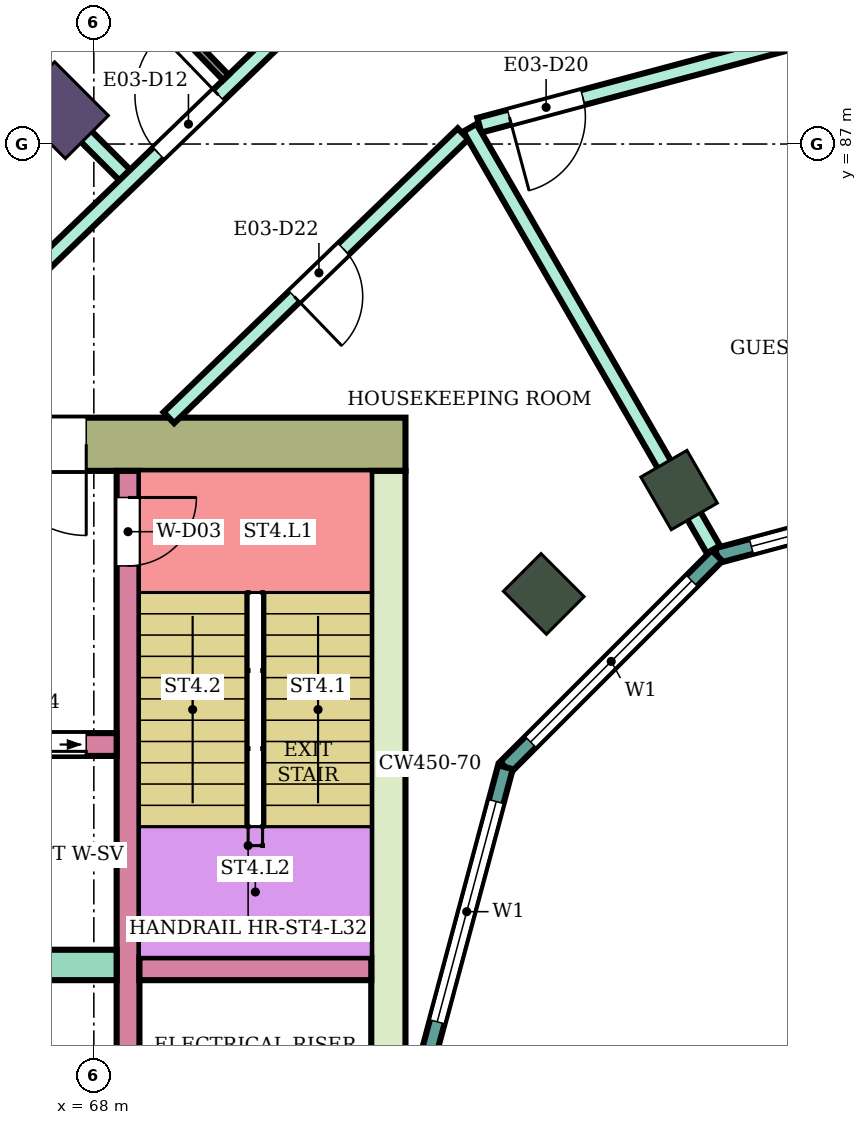
"""IFC4 building model, lengths in metres.
Left out: names, types, materials, properties, quantities, classifications, styles, units other than length and angle.
Written with IfcOpenShell. Run it as: python <this file> out.ifc"""

import sys

from ifc_helpers import new_model, si_unit, direction, frame, frame_2d, origin, origin_2d, place, context, subcontext, project, spatial, rectangle, extrude, element, fill, save


model = new_model("IFC4")
c1 = context("Model", 3, precision=1e-05, world=origin(), true_north=direction((0.0, 1.0)))
c2 = subcontext(c1, "Body", "Model", "MODEL_VIEW")
j1 = project(units=[si_unit("LENGTHUNIT", "METRE"), si_unit("PLANEANGLEUNIT", "RADIAN")], contexts=[c1])
p1 = place(None, origin())
s1 = spatial("IfcSite", under=j1, at=p1, CompositionType="ELEMENT")
p2 = place(p1, origin())
s2 = spatial("IfcBuilding", under=s1, at=p2, CompositionType="ELEMENT")
p3 = place(p2, frame((0.0, 0.0, 138.0)))
s3 = spatial("IfcBuildingStorey", under=s2, at=p3, CompositionType="ELEMENT", Elevation=138.0)
p4 = place(p3, frame((67.555, 87.445, 0.0), z_axis=(0.0, 0.0, 1.0), x_axis=(-0.707106781187, 0.707106781187, 0.0)))
e1 = element("IfcColumn", 1, at=p4, inside=s3, PredefinedType="COLUMN", context=c2, shape_type="SweptSolid", body=[
    extrude(rectangle(XDim=1.0, YDim=0.8, at=origin_2d()), origin(), (0.0, 0.0, 1.0), 3.9),
])
for number, where, z_axis, x_axis in (
    (2, (75.7, 82.448, 0.0), (0.0, 0.0, 1.0), (-0.5, 0.866, 0.0)),
    (3, (73.919, 81.081, 0.0), (0.0, 0.0, 1.0), (-0.707, 0.707, 0.0)),
):
    element("IfcColumn", number, at=place(p3, frame(where, z_axis=z_axis, x_axis=x_axis)), inside=s3, PredefinedType="COLUMN", context=c2, shape_type="SweptSolid", body=[
        extrude(rectangle(XDim=0.8, YDim=0.7, at=origin_2d()), origin(), (0.0, 0.0, 1.0), 3.9),
    ])
p5 = place(p3, frame((72.1, 83.05, 0.0), z_axis=(0.0, 0.0, 1.0), x_axis=(-1.0, 0.0, 0.0)))
e4 = element("IfcWall", 4, at=p5, inside=s3, PredefinedType="SHEAR", context=c2, shape_type="SweptSolid", body=[
    extrude(rectangle(XDim=14.8, YDim=0.7, at=frame_2d((7.4, 0.0))), origin(), (0.0, 0.0, 1.0), 3.58),
])
p6 = place(p5, frame((4.2, 0.0, 0.0)))
e5 = element("IfcOpeningElement", 5, at=p6, cuts=e4, PredefinedType="OPENING", context=c2, shape_type="SweptSolid", body=[
    extrude(rectangle(XDim=2.4, YDim=2.4, at=frame_2d((1.2, 1.2))), frame((0.0, 0.36, 0.0), z_axis=(0.0, -1.0, 0.0), x_axis=(1.0, 0.0, 0.0)), (0.0, 0.0, 1.0), 0.72),
])
p7 = place(p3, frame((71.875, 82.7, 0.0), z_axis=(0.0, 0.0, 1.0), x_axis=(0.0, -1.0, 0.0)))
e6 = element("IfcWall", 6, at=p7, inside=s3, PredefinedType="SHEAR", context=c2, shape_type="SweptSolid", body=[
    extrude(rectangle(XDim=7.7, YDim=0.45, at=frame_2d((3.85, 0.0))), origin(), (0.0, 0.0, 1.0), 3.58),
])
p8 = place(p3, frame((68.45, 82.7, 0.0), z_axis=(0.0, 0.0, 1.0), x_axis=(0.0, -1.0, 0.0)))
e7 = element("IfcWall", 7, at=p8, inside=s3, PredefinedType="SHEAR", context=c2, shape_type="SweptSolid", body=[
    extrude(rectangle(XDim=7.7, YDim=0.3, at=frame_2d((3.85, 0.0))), origin(), (0.0, 0.0, 1.0), 3.58),
])
p9 = place(p8, frame((0.35, 0.0, 0.0)))
e8 = element("IfcOpeningElement", 8, at=p9, cuts=e7, PredefinedType="OPENING", context=c2, shape_type="SweptSolid", body=[
    extrude(rectangle(XDim=0.9, YDim=2.1, at=frame_2d((0.45, 1.05))), frame((0.0, 0.16, 0.0), z_axis=(0.0, -1.0, 0.0), x_axis=(1.0, 0.0, 0.0)), (0.0, 0.0, 1.0), 0.32),
])
p10 = place(p3, frame((71.65, 76.15, 0.0), z_axis=(0.0, 0.0, 1.0), x_axis=(-1.0, 0.0, 0.0)))
e9 = element("IfcWall", 9, at=p10, inside=s3, PredefinedType="SHEAR", context=c2, shape_type="SweptSolid", body=[
    extrude(rectangle(XDim=3.05, YDim=0.3, at=frame_2d((1.525, 0.0))), origin(), (0.0, 0.0, 1.0), 3.58),
])
p11 = place(p3, frame((68.3, 76.2, 0.0), z_axis=(0.0, 0.0, 1.0), x_axis=(-1.0, 0.0, 0.0)))
e10 = element("IfcWall", 10, at=p11, inside=s3, PredefinedType="SHEAR", context=c2, shape_type="SweptSolid", body=[
    extrude(rectangle(XDim=11.0, YDim=0.4, at=frame_2d((5.5, 0.0))), origin(), (0.0, 0.0, 1.0), 3.58),
])
p12 = place(p3, frame((68.3, 79.1, 0.0), z_axis=(0.0, 0.0, 1.0), x_axis=(-1.0, 0.0, 0.0)))
e11 = element("IfcWall", 11, at=p12, inside=s3, PredefinedType="SHEAR", context=c2, shape_type="SweptSolid", body=[
    extrude(rectangle(XDim=11.0, YDim=0.3, at=frame_2d((5.5, 0.0))), origin(), (0.0, 0.0, 1.0), 3.58),
])
p13 = place(p12, frame((0.4, 0.0, 0.0)))
e12 = element("IfcOpeningElement", 12, at=p13, cuts=e11, PredefinedType="OPENING", context=c2, shape_type="SweptSolid", body=[
    extrude(rectangle(XDim=1.4, YDim=2.1, at=frame_2d((0.7, 1.05))), frame((0.0, 0.16, 0.0), z_axis=(0.0, -1.0, 0.0), x_axis=(1.0, 0.0, 0.0)), (0.0, 0.0, 1.0), 0.32),
])
p14 = place(p12, frame((5.4, 0.0, 0.0)))
e13 = element("IfcOpeningElement", 13, at=p14, cuts=e11, PredefinedType="OPENING", context=c2, shape_type="SweptSolid", body=[
    extrude(rectangle(XDim=1.4, YDim=2.1, at=frame_2d((0.7, 1.05))), frame((0.0, 0.16, 0.0), z_axis=(0.0, -1.0, 0.0), x_axis=(1.0, 0.0, 0.0)), (0.0, 0.0, 1.0), 0.32),
])
p15 = place(p12, frame((8.1, 0.0, 0.0)))
e14 = element("IfcOpeningElement", 14, at=p15, cuts=e11, PredefinedType="OPENING", context=c2, shape_type="SweptSolid", body=[
    extrude(rectangle(XDim=1.0, YDim=2.1, at=frame_2d((0.5, 1.05))), frame((0.0, 0.16, 0.0), z_axis=(0.0, -1.0, 0.0), x_axis=(1.0, 0.0, 0.0)), (0.0, 0.0, 1.0), 0.32),
])
p16 = place(p3, frame((80.0, 82.604, 0.0), z_axis=(0.0, 0.0, 1.0), x_axis=(-0.965933654434, -0.258789828301, 0.0)))
e15 = element("IfcWall", 15, at=p16, inside=s3, PredefinedType="NOTDEFINED", context=c2, shape_type="SweptSolid", body=[
    extrude(rectangle(XDim=3.936, YDim=0.2, at=frame_2d((1.968, 0.0))), origin(), (0.0, 0.0, 1.0), 3.9),
])
p17 = place(p16, frame((0.468, 0.0, 0.9)))
e16 = element("IfcOpeningElement", 16, at=p17, cuts=e15, PredefinedType="OPENING", context=c2, shape_type="SweptSolid", body=[
    extrude(rectangle(XDim=3.0, YDim=2.3, at=frame_2d((1.5, 1.15))), frame((0.0, 0.11, 0.0), z_axis=(0.0, -1.0, 0.0), x_axis=(1.0, 0.0, 0.0)), (0.0, 0.0, 1.0), 0.22),
])
p18 = place(p3, frame((76.198, 81.585, 0.0), z_axis=(0.0, 0.0, 1.0), x_axis=(-0.707106781187, -0.707106781187, 0.0)))
e17 = element("IfcWall", 17, at=p18, inside=s3, PredefinedType="NOTDEFINED", context=c2, shape_type="SweptSolid", body=[
    extrude(rectangle(XDim=3.936, YDim=0.2, at=frame_2d((1.968, 0.0))), origin(), (0.0, 0.0, 1.0), 3.9),
])
p19 = place(p18, frame((0.468, 0.0, 0.9)))
e18 = element("IfcOpeningElement", 18, at=p19, cuts=e17, PredefinedType="OPENING", context=c2, shape_type="SweptSolid", body=[
    extrude(rectangle(XDim=3.0, YDim=2.3, at=frame_2d((1.5, 1.15))), frame((0.0, 0.11, 0.0), z_axis=(0.0, -1.0, 0.0), x_axis=(1.0, 0.0, 0.0)), (0.0, 0.0, 1.0), 0.22),
])
p20 = place(p3, frame((73.415, 78.802, 0.0), z_axis=(0.0, 0.0, 1.0), x_axis=(-0.258789828301, -0.965933654434, 0.0)))
e19 = element("IfcWall", 19, at=p20, inside=s3, PredefinedType="NOTDEFINED", context=c2, shape_type="SweptSolid", body=[
    extrude(rectangle(XDim=3.936, YDim=0.2, at=frame_2d((1.968, 0.0))), origin(), (0.0, 0.0, 1.0), 3.9),
])
p21 = place(p20, frame((0.468, 0.0, 0.9)))
e20 = element("IfcOpeningElement", 20, at=p21, cuts=e19, PredefinedType="OPENING", context=c2, shape_type="SweptSolid", body=[
    extrude(rectangle(XDim=3.0, YDim=2.3, at=frame_2d((1.5, 1.15))), frame((0.0, 0.11, 0.0), z_axis=(0.0, -1.0, 0.0), x_axis=(1.0, 0.0, 0.0)), (0.0, 0.0, 1.0), 0.22),
])
p22 = place(p3, frame((63.596, 91.406, 0.0), z_axis=(0.0, 0.0, 1.0), x_axis=(0.706963264491, -0.707250268759, 0.0)))
e21 = element("IfcWall", 21, at=p22, inside=s3, PredefinedType="PARTITIONING", context=c2, shape_type="SweptSolid", body=[
    extrude(rectangle(XDim=6.805, YDim=0.2, at=frame_2d((3.403, 0.0))), origin(), (0.0, 0.0, 1.0), 3.45),
])
p23 = place(p3, frame((66.797, 84.9, 0.0), z_axis=(0.0, 0.0, 1.0), x_axis=(0.719692092412, 0.694293376116, 0.0)))
e22 = element("IfcWall", 22, at=p23, inside=s3, PredefinedType="PARTITIONING", context=c2, shape_type="SweptSolid", body=[
    extrude(rectangle(XDim=6.584, YDim=0.2, at=frame_2d((3.292, 0.0))), origin(), (0.0, 0.0, 1.0), 3.45),
])
p24 = place(p23, frame((2.852, 0.0, 0.0)))
e23 = element("IfcOpeningElement", 23, at=p24, cuts=e22, PredefinedType="OPENING", context=c2, shape_type="SweptSolid", body=[
    extrude(rectangle(XDim=1.1, YDim=2.1, at=frame_2d((0.55, 1.05))), frame((0.0, 0.11, 0.0), z_axis=(0.0, -1.0, 0.0), x_axis=(1.0, 0.0, 0.0)), (0.0, 0.0, 1.0), 0.22),
])
p25 = place(p3, frame((68.987, 83.4, 0.0), z_axis=(0.0, 0.0, 1.0), x_axis=(0.719547721855, 0.694442996922, 0.0)))
e24 = element("IfcWall", 24, at=p25, inside=s3, PredefinedType="PARTITIONING", context=c2, shape_type="SweptSolid", body=[
    extrude(rectangle(XDim=5.378, YDim=0.2, at=frame_2d((2.689, 0.0))), origin(), (0.0, 0.0, 1.0), 3.45),
])
p26 = place(p25, frame((2.294, 0.0, 0.0)))
e25 = element("IfcOpeningElement", 25, at=p26, cuts=e24, PredefinedType="OPENING", context=c2, shape_type="SweptSolid", body=[
    extrude(rectangle(XDim=0.9, YDim=2.1, at=frame_2d((0.45, 1.05))), frame((0.0, 0.11, 0.0), z_axis=(0.0, -1.0, 0.0), x_axis=(1.0, 0.0, 0.0)), (0.0, 0.0, 1.0), 0.22),
])
p27 = place(p3, frame((73.071, 87.247, 0.0), z_axis=(0.0, 0.0, 1.0), x_axis=(0.965931651205, 0.258797305243, 0.0)))
e26 = element("IfcWall", 26, at=p27, inside=s3, PredefinedType="PARTITIONING", context=c2, shape_type="SweptSolid", body=[
    extrude(rectangle(XDim=7.043, YDim=0.2, at=frame_2d((3.521, 0.0))), origin(), (0.0, 0.0, 1.0), 3.45),
])
p28 = place(p27, frame((0.41, 0.0, 0.0)))
e27 = element("IfcOpeningElement", 27, at=p28, cuts=e26, PredefinedType="OPENING", context=c2, shape_type="SweptSolid", body=[
    extrude(rectangle(XDim=1.0, YDim=2.1, at=frame_2d((0.5, 1.05))), frame((0.0, 0.11, 0.0), z_axis=(0.0, -1.0, 0.0), x_axis=(1.0, 0.0, 0.0)), (0.0, 0.0, 1.0), 0.22),
])
p29 = place(p3, frame((72.948, 87.214, 0.0), z_axis=(0.0, 0.0, 1.0), x_axis=(0.499898430755, -0.866084036875, 0.0)))
e28 = element("IfcWall", 28, at=p29, inside=s3, PredefinedType="PARTITIONING", context=c2, shape_type="SweptSolid", body=[
    extrude(rectangle(XDim=6.405, YDim=0.2, at=frame_2d((3.203, 0.0))), origin(), (0.0, 0.0, 1.0), 3.45),
])
p30 = place(p3, frame((67.758, 89.926, 0.0), z_axis=(0.0, 0.0, 1.0), x_axis=(0.694485934895, -0.719506279495, 0.0)))
e29 = element("IfcWall", 29, at=p30, inside=s3, PredefinedType="PARTITIONING", context=c2, shape_type="SweptSolid", body=[
    extrude(rectangle(XDim=2.849, YDim=0.1, at=frame_2d((1.425, 0.0))), origin(), (0.0, 0.0, 1.0), 3.45),
])
p31 = place(p17, origin())
e30 = element("IfcWindow", 30, at=p31, inside=s3, PartitioningType="SINGLE_PANEL", PredefinedType="WINDOW", context=c2, shape_type="SweptSolid", body=[
    extrude(rectangle(XDim=3.0, YDim=2.3, at=frame_2d((1.5, 1.15))), frame((0.0, 0.03, 0.0), z_axis=(0.0, -1.0, 0.0), x_axis=(1.0, 0.0, 0.0)), (0.0, 0.0, 1.0), 0.06),
])
fill(e16, e30)
p32 = place(p19, origin())
e31 = element("IfcWindow", 31, at=p32, inside=s3, PartitioningType="SINGLE_PANEL", PredefinedType="WINDOW", context=c2, shape_type="SweptSolid", body=[
    extrude(rectangle(XDim=3.0, YDim=2.3, at=frame_2d((1.5, 1.15))), frame((0.0, 0.03, 0.0), z_axis=(0.0, -1.0, 0.0), x_axis=(1.0, 0.0, 0.0)), (0.0, 0.0, 1.0), 0.06),
])
fill(e18, e31)
p33 = place(p21, origin())
e32 = element("IfcWindow", 32, at=p33, inside=s3, PartitioningType="SINGLE_PANEL", PredefinedType="WINDOW", context=c2, shape_type="SweptSolid", body=[
    extrude(rectangle(XDim=3.0, YDim=2.3, at=frame_2d((1.5, 1.15))), frame((0.0, 0.03, 0.0), z_axis=(0.0, -1.0, 0.0), x_axis=(1.0, 0.0, 0.0)), (0.0, 0.0, 1.0), 0.06),
])
fill(e20, e32)
p34 = place(p24, origin())
e33 = element("IfcDoor", 33, at=p34, inside=s3, OperationType="SINGLE_SWING_RIGHT", PredefinedType="DOOR", context=c2, shape_type="SweptSolid", body=[
    extrude(rectangle(XDim=1.1, YDim=2.1, at=frame_2d((0.55, 1.05))), frame((0.0, 0.025, 0.0), z_axis=(0.0, -1.0, 0.0), x_axis=(1.0, 0.0, 0.0)), (0.0, 0.0, 1.0), 0.05),
])
fill(e23, e33)
p35 = place(p28, frame((1.0, 0.0, 0.0), z_axis=(0.0, 0.0, 1.0), x_axis=(-1.0, 0.0, 0.0)))
e34 = element("IfcDoor", 34, at=p35, inside=s3, OperationType="SINGLE_SWING_RIGHT", PredefinedType="DOOR", context=c2, shape_type="SweptSolid", body=[
    extrude(rectangle(XDim=1.0, YDim=2.1, at=frame_2d((0.5, 1.05))), frame((0.0, 0.025, 0.0), z_axis=(0.0, -1.0, 0.0), x_axis=(1.0, 0.0, 0.0)), (0.0, 0.0, 1.0), 0.05),
])
fill(e27, e34)
p36 = place(p26, frame((0.9, 0.0, 0.0), z_axis=(0.0, 0.0, 1.0), x_axis=(-1.0, 0.0, 0.0)))
e35 = element("IfcDoor", 35, at=p36, inside=s3, OperationType="SINGLE_SWING_RIGHT", PredefinedType="DOOR", context=c2, shape_type="SweptSolid", body=[
    extrude(rectangle(XDim=0.9, YDim=2.1, at=frame_2d((0.45, 1.05))), frame((0.0, 0.025, 0.0), z_axis=(0.0, -1.0, 0.0), x_axis=(1.0, 0.0, 0.0)), (0.0, 0.0, 1.0), 0.05),
])
fill(e25, e35)
p37 = place(p9, origin())
e36 = element("IfcDoor", 36, at=p37, inside=s3, OperationType="SINGLE_SWING_LEFT", PredefinedType="DOOR", context=c2, shape_type="SweptSolid", body=[
    extrude(rectangle(XDim=0.9, YDim=2.1, at=frame_2d((0.45, 1.05))), frame((0.0, 0.025, 0.0), z_axis=(0.0, -1.0, 0.0), x_axis=(1.0, 0.0, 0.0)), (0.0, 0.0, 1.0), 0.05),
])
fill(e8, e36)
p38 = place(p13, origin())
e37 = element("IfcDoor", 37, at=p38, inside=s3, OperationType="DOUBLE_DOOR_SLIDING", PredefinedType="DOOR", context=c2, shape_type="SweptSolid", body=[
    extrude(rectangle(XDim=1.4, YDim=2.1, at=frame_2d((0.7, 1.05))), frame((0.0, 0.025, 0.0), z_axis=(0.0, -1.0, 0.0), x_axis=(1.0, 0.0, 0.0)), (0.0, 0.0, 1.0), 0.05),
])
fill(e12, e37)
p39 = place(p6, origin())
e38 = element("IfcDoor", 38, at=p39, inside=s3, OperationType="DOUBLE_DOOR_SINGLE_SWING", PredefinedType="DOOR", context=c2, shape_type="SweptSolid", body=[
    extrude(rectangle(XDim=2.4, YDim=2.4, at=frame_2d((1.2, 1.2))), frame((0.0, 0.025, 0.0), z_axis=(0.0, -1.0, 0.0), x_axis=(1.0, 0.0, 0.0)), (0.0, 0.0, 1.0), 0.05),
])
fill(e5, e38)
save(model, sys.argv[1])
